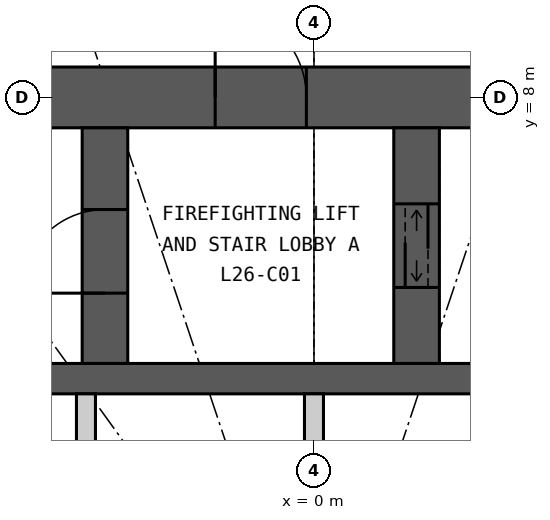
"""IFC4 building model, lengths in metres.
Left out: names, types, materials, properties, quantities, classifications, styles, units other than length and angle.
Written with IfcOpenShell. Run it as: python <this file> out.ifc"""

import sys

from ifc_helpers import new_model, si_unit, direction, frame, frame_2d, origin, place, context, subcontext, project, spatial, rectangle, extrude, element, fill, save


model = new_model("IFC4")
c1 = context("Model", 3, precision=1e-05, world=origin(), true_north=direction((0.0, 1.0)))
c2 = subcontext(c1, "Body", "Model", "MODEL_VIEW")
j1 = project(units=[si_unit("LENGTHUNIT", "METRE"), si_unit("PLANEANGLEUNIT", "RADIAN")], contexts=[c1])
p1 = place(None, origin())
s1 = spatial("IfcSite", under=j1, at=p1, CompositionType="ELEMENT")
p2 = place(p1, origin())
s2 = spatial("IfcBuilding", under=s1, at=p2, CompositionType="ELEMENT")
p3 = place(p2, frame((0.0, 0.0, 105.6)))
s3 = spatial("IfcBuildingStorey", under=s2, at=p3, CompositionType="ELEMENT", Elevation=105.6)
p4 = place(p3, frame((-12.4, 8.0, 0.0), z_axis=(0.0, 0.0, 1.0), x_axis=(1.0, 0.0, 0.0)))
e1 = element("IfcWall", 1, at=p4, inside=s3, PredefinedType="SHEAR", context=c2, shape_type="SweptSolid", body=[
    extrude(rectangle(XDim=24.8, YDim=0.8, at=frame_2d((12.4, 0.0))), origin(), (0.0, 0.0, 1.0), 3.3),
])
p5 = place(p4, frame((11.1, 0.0, 0.0)))
e2 = element("IfcOpeningElement", 2, at=p5, cuts=e1, PredefinedType="OPENING", context=c2, shape_type="SweptSolid", body=[
    extrude(rectangle(XDim=1.2, YDim=2.2, at=frame_2d((0.6, 1.1))), frame((0.0, 0.41, 0.0), z_axis=(0.0, -1.0, 0.0), x_axis=(1.0, 0.0, 0.0)), (0.0, 0.0, 1.0), 0.82),
])
p6 = place(p4, frame((18.7, 0.0, 0.0)))
e3 = element("IfcOpeningElement", 3, at=p6, cuts=e1, PredefinedType="OPENING", context=c2, shape_type="SweptSolid", body=[
    extrude(rectangle(XDim=0.9, YDim=2.2, at=frame_2d((0.45, 1.1))), frame((0.0, 0.41, 0.0), z_axis=(0.0, -1.0, 0.0), x_axis=(1.0, 0.0, 0.0)), (0.0, 0.0, 1.0), 0.82),
])
p7 = place(p3, frame((-11.6, 4.3, 0.0), z_axis=(0.0, 0.0, 1.0), x_axis=(1.0, 0.0, 0.0)))
e4 = element("IfcWall", 4, at=p7, inside=s3, PredefinedType="SHEAR", context=c2, shape_type="SweptSolid", body=[
    extrude(rectangle(XDim=23.2, YDim=0.4, at=frame_2d((11.6, 0.0))), origin(), (0.0, 0.0, 1.0), 3.3),
])
p8 = place(p3, frame((-2.75, 4.5, 0.0), z_axis=(0.0, 0.0, 1.0), x_axis=(0.0, 1.0, 0.0)))
e5 = element("IfcWall", 5, at=p8, inside=s3, PredefinedType="SHEAR", context=c2, shape_type="SweptSolid", body=[
    extrude(rectangle(XDim=3.1, YDim=0.6, at=frame_2d((1.55, 0.0))), origin(), (0.0, 0.0, 1.0), 3.3),
])
p9 = place(p8, frame((0.925, 0.0, 0.0)))
e6 = element("IfcOpeningElement", 6, at=p9, cuts=e5, PredefinedType="OPENING", context=c2, shape_type="SweptSolid", body=[
    extrude(rectangle(XDim=1.1, YDim=2.2, at=frame_2d((0.55, 1.1))), frame((0.0, 0.31, 0.0), z_axis=(0.0, -1.0, 0.0), x_axis=(1.0, 0.0, 0.0)), (0.0, 0.0, 1.0), 0.62),
])
p10 = place(p3, frame((1.35, 4.5, 0.0), z_axis=(0.0, 0.0, 1.0), x_axis=(0.0, 1.0, 0.0)))
e7 = element("IfcWall", 7, at=p10, inside=s3, PredefinedType="SHEAR", context=c2, shape_type="SweptSolid", body=[
    extrude(rectangle(XDim=3.1, YDim=0.6, at=frame_2d((1.55, 0.0))), origin(), (0.0, 0.0, 1.0), 3.3),
])
p11 = place(p10, frame((1.0, 0.0, 0.0)))
e8 = element("IfcOpeningElement", 8, at=p11, cuts=e7, PredefinedType="OPENING", context=c2, shape_type="SweptSolid", body=[
    extrude(rectangle(XDim=1.1, YDim=2.2, at=frame_2d((0.55, 1.1))), frame((0.0, 0.31, 0.0), z_axis=(0.0, -1.0, 0.0), x_axis=(1.0, 0.0, 0.0)), (0.0, 0.0, 1.0), 0.62),
])
for number, where, z_axis, x_axis in (
    (9, (-3.0, 1.75, 0.0), (0.0, 0.0, 1.0), (0.0, 1.0, 0.0)),
    (10, (0.0, 1.75, 0.0), (0.0, 0.0, 1.0), (0.0, 1.0, 0.0)),
):
    element("IfcWall", number, at=place(p3, frame(where, z_axis=z_axis, x_axis=x_axis)), inside=s3, PredefinedType="PARTITIONING", context=c2, shape_type="SweptSolid", body=[
        extrude(rectangle(XDim=2.35, YDim=0.25, at=frame_2d((1.175, 0.0))), origin(), (0.0, 0.0, 1.0), 3.3),
    ])
p12 = place(p5, origin())
e11 = element("IfcDoor", 11, at=p12, inside=s3, OperationType="SINGLE_SWING_LEFT", PredefinedType="DOOR", context=c2, shape_type="SweptSolid", body=[
    extrude(rectangle(XDim=1.2, YDim=2.2, at=frame_2d((0.6, 1.1))), frame((0.0, 0.025, 0.0), z_axis=(0.0, -1.0, 0.0), x_axis=(1.0, 0.0, 0.0)), (0.0, 0.0, 1.0), 0.05),
])
fill(e2, e11)
p13 = place(p9, origin())
e12 = element("IfcDoor", 12, at=p13, inside=s3, OperationType="SINGLE_SWING_LEFT", PredefinedType="DOOR", context=c2, shape_type="SweptSolid", body=[
    extrude(rectangle(XDim=1.1, YDim=2.2, at=frame_2d((0.55, 1.1))), frame((0.0, 0.025, 0.0), z_axis=(0.0, -1.0, 0.0), x_axis=(1.0, 0.0, 0.0)), (0.0, 0.0, 1.0), 0.05),
])
fill(e6, e12)
p14 = place(p11, origin())
e13 = element("IfcDoor", 13, at=p14, inside=s3, OperationType="DOUBLE_DOOR_SLIDING", PredefinedType="DOOR", context=c2, shape_type="SweptSolid", body=[
    extrude(rectangle(XDim=1.1, YDim=2.2, at=frame_2d((0.55, 1.1))), frame((0.0, 0.025, 0.0), z_axis=(0.0, -1.0, 0.0), x_axis=(1.0, 0.0, 0.0)), (0.0, 0.0, 1.0), 0.05),
])
fill(e8, e13)
save(model, sys.argv[1])
